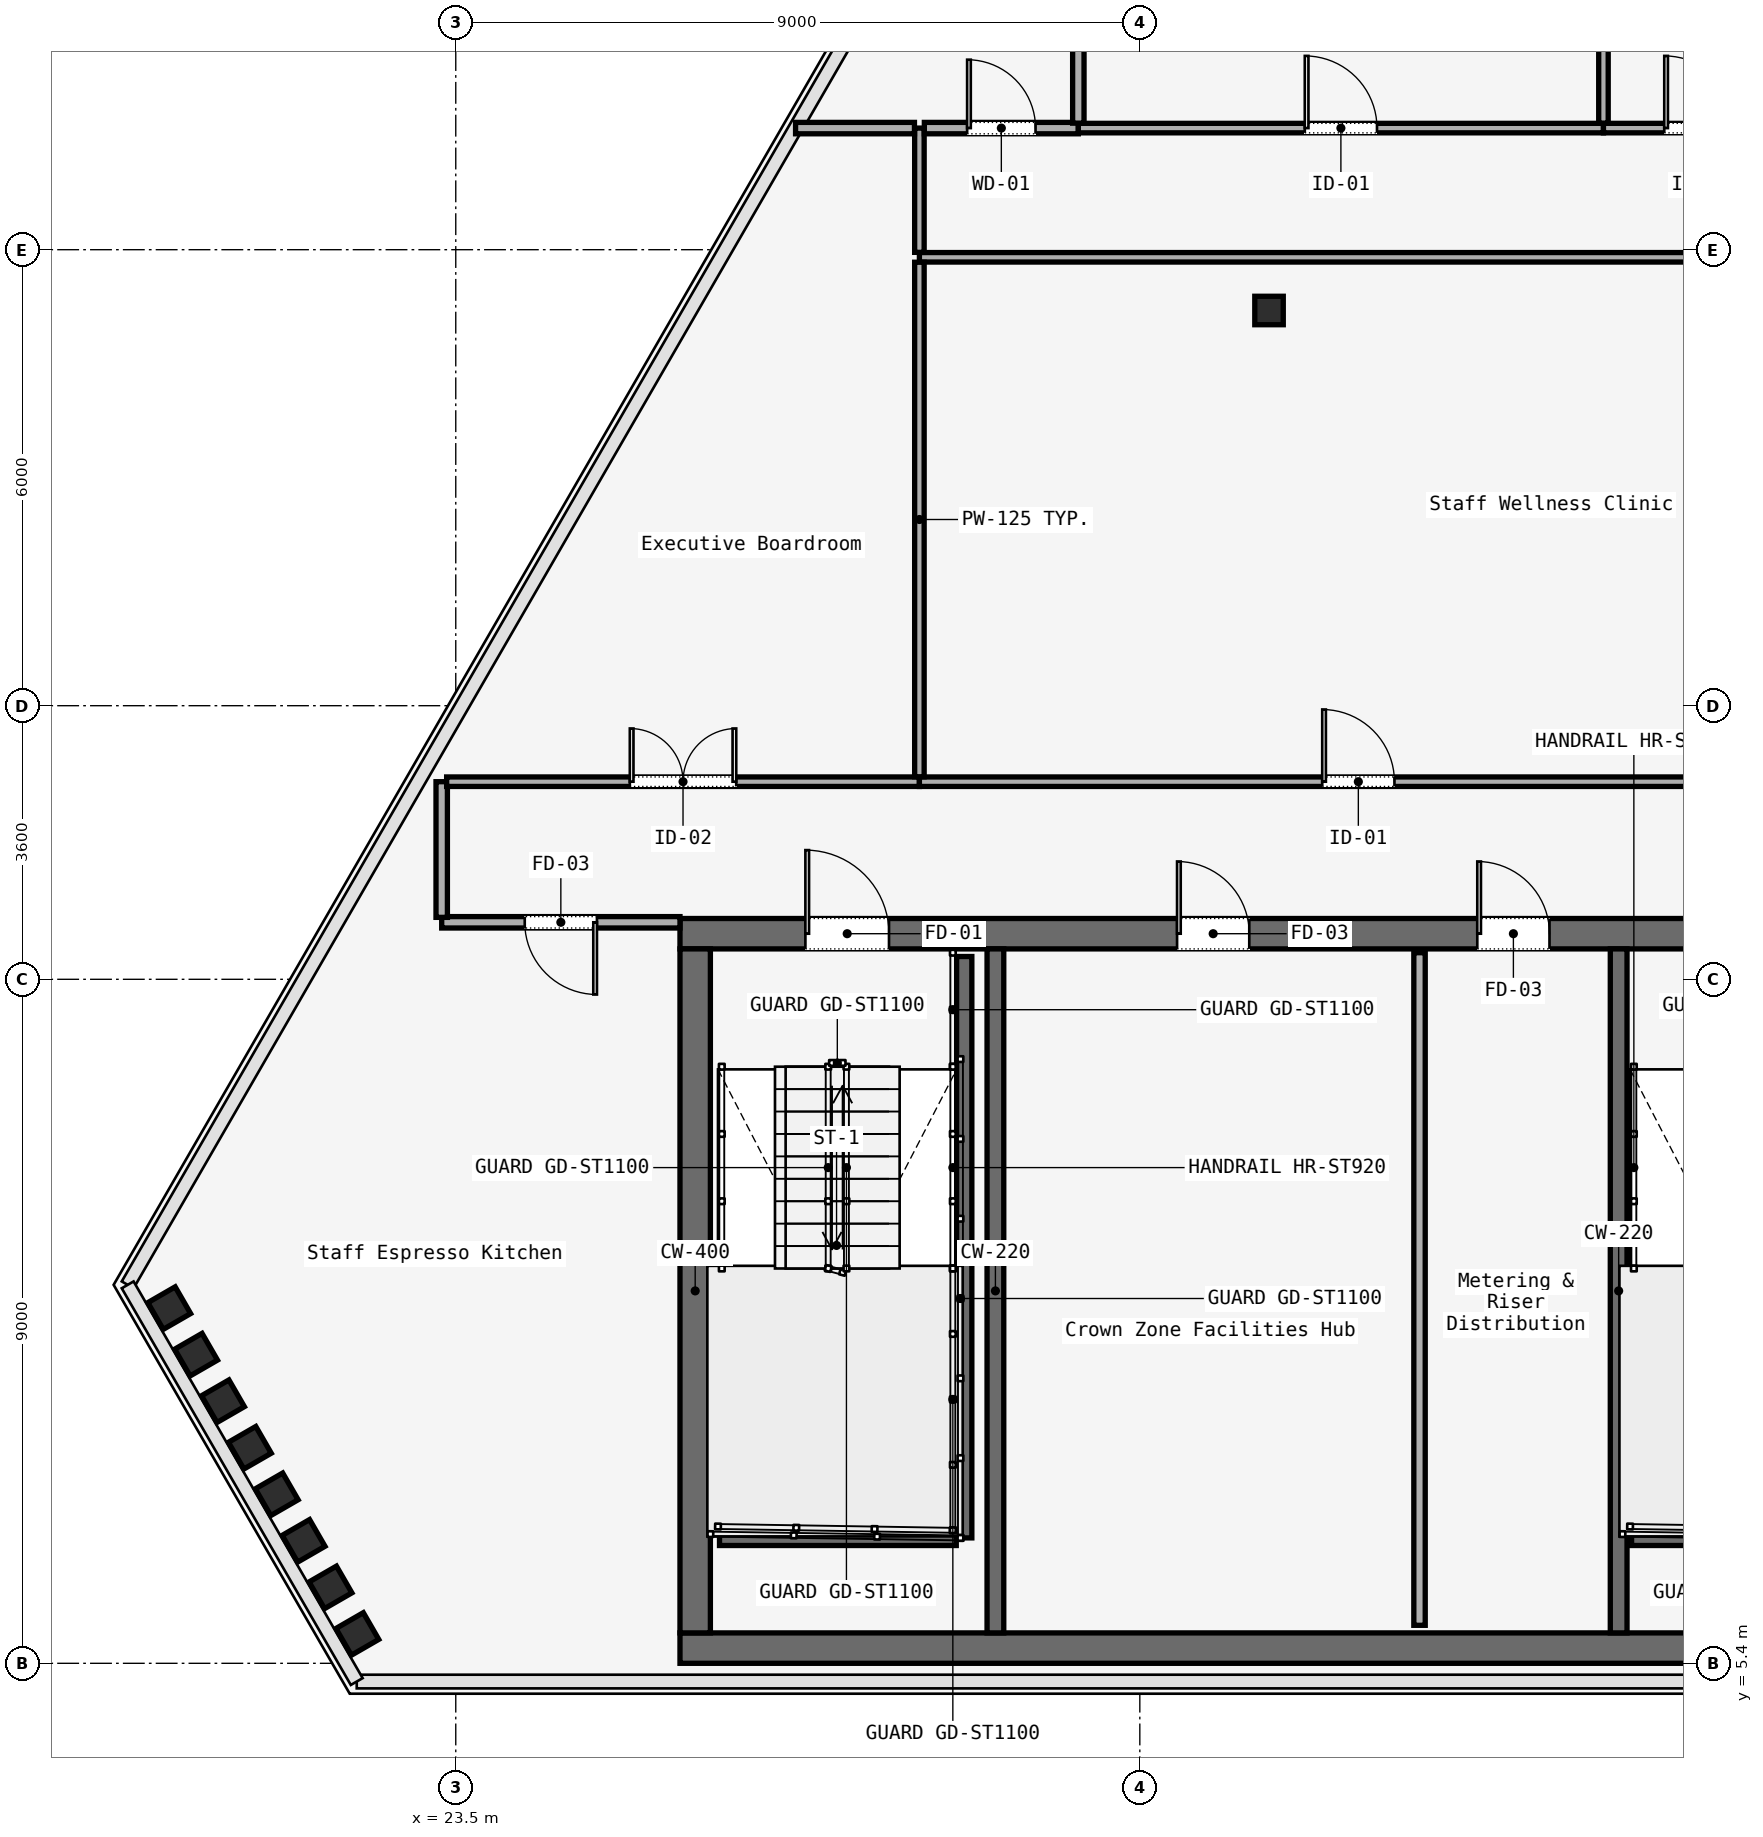
"""IFC4 building model, lengths in metres.
Left out: names, types, materials, properties, quantities, classifications, styles, units other than length and angle.
Written with IfcOpenShell. Run it as: python <this file> out.ifc"""

import sys

from ifc_helpers import new_model, si_unit, direction, frame, frame_2d, origin, origin_2d, place, context, subcontext, project, spatial, rectangle, i_section, extrude, element, fill, save


model = new_model("IFC4")
c1 = context("Model", 3, precision=1e-05, world=origin(), true_north=direction((0.0, 1.0)))
c2 = subcontext(c1, "Body", "Model", "MODEL_VIEW")
j1 = project(units=[si_unit("LENGTHUNIT", "METRE"), si_unit("PLANEANGLEUNIT", "RADIAN")], contexts=[c1])
p1 = place(None, origin())
s1 = spatial("IfcSite", under=j1, at=p1, CompositionType="ELEMENT")
p2 = place(p1, origin())
s2 = spatial("IfcBuilding", under=s1, at=p2, CompositionType="ELEMENT")
p3 = place(p2, frame((0.0, 0.0, 252.2)))
s3 = spatial("IfcBuildingStorey", under=s2, at=p3, CompositionType="ELEMENT", Elevation=252.2)
p4 = place(p3, frame((26.45, 15.0, 0.0), z_axis=(0.0, 0.0, 1.0), x_axis=(1.0, 0.0, 0.0)))
e1 = element("IfcWall", 1, at=p4, inside=s3, PredefinedType="SOLIDWALL", context=c2, shape_type="SweptSolid", body=[
    extrude(rectangle(XDim=31.1, YDim=0.4, at=frame_2d((15.55, 0.0))), origin(), (0.0, 0.0, 1.0), 3.58),
])
p5 = place(p4, frame((1.65, 0.0, 0.0)))
e2 = element("IfcOpeningElement", 2, at=p5, cuts=e1, PredefinedType="OPENING", context=c2, shape_type="SweptSolid", body=[
    extrude(rectangle(XDim=1.1, YDim=2.2, at=frame_2d((0.55, 1.1))), frame((0.0, 0.2, 0.0), z_axis=(0.0, -1.0, 0.0), x_axis=(1.0, 0.0, 0.0)), (0.0, 0.0, 1.0), 0.4),
])
p6 = place(p4, frame((13.65, 0.0, 0.0)))
e3 = element("IfcOpeningElement", 3, at=p6, cuts=e1, PredefinedType="OPENING", context=c2, shape_type="SweptSolid", body=[
    extrude(rectangle(XDim=1.1, YDim=2.2, at=frame_2d((0.55, 1.1))), frame((0.0, 0.2, 0.0), z_axis=(0.0, -1.0, 0.0), x_axis=(1.0, 0.0, 0.0)), (0.0, 0.0, 1.0), 0.4),
])
p7 = place(p4, frame((25.55, 0.0, 0.0)))
e4 = element("IfcOpeningElement", 4, at=p7, cuts=e1, PredefinedType="OPENING", context=c2, shape_type="SweptSolid", body=[
    extrude(rectangle(XDim=1.1, YDim=2.2, at=frame_2d((0.55, 1.1))), frame((0.0, 0.2, 0.0), z_axis=(0.0, -1.0, 0.0), x_axis=(1.0, 0.0, 0.0)), (0.0, 0.0, 1.0), 0.4),
])
p8 = place(p4, frame((19.35, 0.0, 0.0)))
e5 = element("IfcOpeningElement", 5, at=p8, cuts=e1, PredefinedType="OPENING", context=c2, shape_type="SweptSolid", body=[
    extrude(rectangle(XDim=1.1, YDim=2.2, at=frame_2d((0.55, 1.1))), frame((0.0, 0.2, 0.0), z_axis=(0.0, -1.0, 0.0), x_axis=(1.0, 0.0, 0.0)), (0.0, 0.0, 1.0), 0.4),
])
p9 = place(p4, frame((21.4, 0.0, 0.0)))
e6 = element("IfcOpeningElement", 6, at=p9, cuts=e1, PredefinedType="OPENING", context=c2, shape_type="SweptSolid", body=[
    extrude(rectangle(XDim=0.9, YDim=2.1, at=frame_2d((0.45, 1.05))), frame((0.0, 0.2, 0.0), z_axis=(0.0, -1.0, 0.0), x_axis=(1.0, 0.0, 0.0)), (0.0, 0.0, 1.0), 0.4),
])
p10 = place(p4, frame((6.54, 0.0, 0.0)))
e7 = element("IfcOpeningElement", 7, at=p10, cuts=e1, PredefinedType="OPENING", context=c2, shape_type="SweptSolid", body=[
    extrude(rectangle(XDim=0.95, YDim=2.2, at=frame_2d((0.475, 1.1))), frame((0.0, 0.2, 0.0), z_axis=(0.0, -1.0, 0.0), x_axis=(1.0, 0.0, 0.0)), (0.0, 0.0, 1.0), 0.4),
])
p11 = place(p4, frame((10.49, 0.0, 0.0)))
e8 = element("IfcOpeningElement", 8, at=p11, cuts=e1, PredefinedType="OPENING", context=c2, shape_type="SweptSolid", body=[
    extrude(rectangle(XDim=0.95, YDim=2.2, at=frame_2d((0.475, 1.1))), frame((0.0, 0.2, 0.0), z_axis=(0.0, -1.0, 0.0), x_axis=(1.0, 0.0, 0.0)), (0.0, 0.0, 1.0), 0.4),
])
p12 = place(p4, frame((23.35, 0.0, 0.0)))
e9 = element("IfcOpeningElement", 9, at=p12, cuts=e1, PredefinedType="OPENING", context=c2, shape_type="SweptSolid", body=[
    extrude(rectangle(XDim=1.3, YDim=2.3, at=frame_2d((0.65, 1.15))), frame((0.0, 0.2, 0.0), z_axis=(0.0, -1.0, 0.0), x_axis=(1.0, 0.0, 0.0)), (0.0, 0.0, 1.0), 0.4),
])
p13 = place(p3, frame((26.45, 5.6, 0.0), z_axis=(0.0, 0.0, 1.0), x_axis=(1.0, 0.0, 0.0)))
e10 = element("IfcWall", 10, at=p13, inside=s3, PredefinedType="SOLIDWALL", context=c2, shape_type="SweptSolid", body=[
    extrude(rectangle(XDim=31.1, YDim=0.4, at=frame_2d((15.55, 0.0))), origin(), (0.0, 0.0, 1.0), 3.58),
])
p14 = place(p3, frame((26.65, 5.8, 0.0), z_axis=(0.0, 0.0, 1.0), x_axis=(0.0, 1.0, 0.0)))
e11 = element("IfcWall", 11, at=p14, inside=s3, PredefinedType="SOLIDWALL", context=c2, shape_type="SweptSolid", body=[
    extrude(rectangle(XDim=9.0, YDim=0.4, at=frame_2d((4.5, 0.0))), origin(), (0.0, 0.0, 1.0), 3.58),
])
for number, where, z_axis, x_axis in (
    (12, (30.6, 5.8, 0.0), (0.0, 0.0, 1.0), (0.0, 1.0, 0.0)),
    (13, (38.8, 5.8, 0.0), (0.0, 0.0, 1.0), (0.0, 1.0, 0.0)),
):
    element("IfcWall", number, at=place(p3, frame(where, z_axis=z_axis, x_axis=x_axis)), inside=s3, PredefinedType="SOLIDWALL", context=c2, shape_type="SweptSolid", body=[
        extrude(rectangle(XDim=9.0, YDim=0.22, at=frame_2d((4.5, 0.0))), origin(), (0.0, 0.0, 1.0), 3.58),
    ])
p15 = place(p3, frame((34.2, 23.2, 0.0), z_axis=(0.0, 0.0, 1.0), x_axis=(1.0, 0.0, 0.0)))
e14 = element("IfcColumn", 14, at=p15, inside=s3, PredefinedType="COLUMN", context=c2, shape_type="SweptSolid", body=[
    extrude(i_section(OverallWidth=0.375, OverallDepth=0.375, WebThickness=0.017, FlangeThickness=0.027, FilletRadius=0.015, at=origin_2d()), origin(), (0.0, 0.0, 1.0), 3.58),
])
for number, where, z_axis, x_axis in (
    (15, (19.73, 10.073, 0.0), (0.0, 0.0, 1.0), (-0.5, 0.866, 0.0)),
    (16, (20.083, 9.461, 0.0), (0.0, 0.0, 1.0), (-0.5, 0.866, 0.0)),
    (17, (20.437, 8.849, 0.0), (0.0, 0.0, 1.0), (-0.5, 0.866, 0.0)),
    (18, (20.791, 8.236, 0.0), (0.0, 0.0, 1.0), (-0.5, 0.866, 0.0)),
    (19, (21.144, 7.624, 0.0), (0.0, 0.0, 1.0), (-0.5, 0.866, 0.0)),
    (20, (21.498, 7.011, 0.0), (0.0, 0.0, 1.0), (-0.5, 0.866, 0.0)),
    (21, (21.851, 6.399, 0.0), (0.0, 0.0, 1.0), (-0.5, 0.866, 0.0)),
    (22, (22.205, 5.786, 0.0), (0.0, 0.0, 1.0), (-0.5, 0.866, 0.0)),
):
    element("IfcColumn", number, at=place(p3, frame(where, z_axis=z_axis, x_axis=x_axis)), inside=s3, PredefinedType="COLUMN", context=c2, shape_type="SweptSolid", body=[
        extrude(i_section(OverallWidth=0.406, OverallDepth=0.416, WebThickness=0.03, FlangeThickness=0.037, FilletRadius=0.015, at=origin_2d()), origin(), (0.0, 0.0, 1.0), 3.58),
    ])
p16 = place(p3, frame((30.19, 14.7, 0.0), z_axis=(0.0, 0.0, 1.0), x_axis=(0.0, -1.0, 0.0)))
e23 = element("IfcWall", 23, at=p16, inside=s3, PredefinedType="SOLIDWALL", context=c2, shape_type="SweptSolid", body=[
    extrude(rectangle(XDim=7.65, YDim=0.2, at=frame_2d((3.825, 0.0))), origin(), (0.0, 0.0, 1.0), 3.8),
])
for number, where, z_axis, x_axis in (
    (24, (26.97, 7.05, 0.0), (0.0, 0.0, 1.0), (1.0, 0.0, 0.0)),
    (25, (38.97, 7.05, 0.0), (0.0, 0.0, 1.0), (1.0, 0.0, 0.0)),
):
    element("IfcWall", number, at=place(p3, frame(where, z_axis=z_axis, x_axis=x_axis)), inside=s3, PredefinedType="SOLIDWALL", context=c2, shape_type="SweptSolid", body=[
        extrude(rectangle(XDim=3.115, YDim=0.2, at=frame_2d((1.558, 0.0))), origin(), (0.0, 0.0, 1.0), 3.8),
    ])
p17 = place(p3, frame((36.18, 5.9, 0.0), z_axis=(0.0, 0.0, 1.0), x_axis=(0.0, 1.0, 0.0)))
e26 = element("IfcWall", 26, at=p17, inside=s3, PredefinedType="PARTITIONING", context=c2, shape_type="SweptSolid", body=[
    extrude(rectangle(XDim=8.85, YDim=0.15, at=frame_2d((4.425, 0.0))), origin(), (0.0, 0.0, 1.0), 3.01),
])
p18 = place(p3, frame((26.45, 15.15, 0.0), z_axis=(0.0, 0.0, 1.0), x_axis=(-1.0, 0.0, 0.0)))
e27 = element("IfcWall", 27, at=p18, inside=s3, PredefinedType="PARTITIONING", context=c2, shape_type="SweptSolid", body=[
    extrude(rectangle(XDim=3.135, YDim=0.15, at=frame_2d((1.567, 0.0))), origin(), (0.0, 0.0, 1.0), 3.01),
])
p19 = place(p18, frame((1.093, 0.0, 0.0)))
e28 = element("IfcOpeningElement", 28, at=p19, cuts=e27, PredefinedType="OPENING", context=c2, shape_type="SweptSolid", body=[
    extrude(rectangle(XDim=0.95, YDim=2.2, at=frame_2d((0.475, 1.1))), frame((0.0, 0.075, 0.0), z_axis=(0.0, -1.0, 0.0), x_axis=(1.0, 0.0, 0.0)), (0.0, 0.0, 1.0), 0.15),
])
p20 = place(p3, frame((23.315, 15.215, 0.0), z_axis=(0.0, 0.0, 1.0), x_axis=(0.0, 1.0, 0.0)))
e29 = element("IfcWall", 29, at=p20, inside=s3, PredefinedType="PARTITIONING", context=c2, shape_type="SweptSolid", body=[
    extrude(rectangle(XDim=1.785, YDim=0.15, at=frame_2d((0.893, 0.0))), origin(), (0.0, 0.0, 1.0), 3.01),
])
p21 = place(p3, frame((23.38, 17.0, 0.0), z_axis=(0.0, 0.0, 1.0), x_axis=(1.0, 0.0, 0.0)))
e30 = element("IfcWall", 30, at=p21, inside=s3, PredefinedType="PARTITIONING", context=c2, shape_type="SweptSolid", body=[
    extrude(rectangle(XDim=6.22, YDim=0.125, at=frame_2d((3.11, 0.0))), origin(), (0.0, 0.0, 1.0), 3.01),
])
p22 = place(p21, frame((2.41, 0.0, 0.0)))
e31 = element("IfcOpeningElement", 31, at=p22, cuts=e30, PredefinedType="OPENING", context=c2, shape_type="SweptSolid", body=[
    extrude(rectangle(XDim=1.4, YDim=2.2, at=frame_2d((0.7, 1.1))), frame((0.0, 0.062, 0.0), z_axis=(0.0, -1.0, 0.0), x_axis=(1.0, 0.0, 0.0)), (0.0, 0.0, 1.0), 0.125),
])
p23 = place(p3, frame((29.6, 17.0, 0.0), z_axis=(0.0, 0.0, 1.0), x_axis=(1.0, 0.0, 0.0)))
e32 = element("IfcWall", 32, at=p23, inside=s3, PredefinedType="PARTITIONING", context=c2, shape_type="SweptSolid", body=[
    extrude(rectangle(XDim=11.55, YDim=0.125, at=frame_2d((5.775, 0.0))), origin(), (0.0, 0.0, 1.0), 3.01),
])
p24 = place(p23, frame((5.3, 0.0, 0.0)))
e33 = element("IfcOpeningElement", 33, at=p24, cuts=e32, PredefinedType="OPENING", context=c2, shape_type="SweptSolid", body=[
    extrude(rectangle(XDim=0.95, YDim=2.2, at=frame_2d((0.475, 1.1))), frame((0.0, 0.062, 0.0), z_axis=(0.0, -1.0, 0.0), x_axis=(1.0, 0.0, 0.0)), (0.0, 0.0, 1.0), 0.125),
])
p25 = place(p3, frame((41.085, 23.9, 0.0), z_axis=(0.0, 0.0, 1.0), x_axis=(-1.0, 0.0, 0.0)))
e34 = element("IfcWall", 34, at=p25, inside=s3, PredefinedType="PARTITIONING", context=c2, shape_type="SweptSolid", body=[
    extrude(rectangle(XDim=11.485, YDim=0.125, at=frame_2d((5.742, 0.0))), origin(), (0.0, 0.0, 1.0), 3.01),
])
p26 = place(p3, frame((29.6, 23.965, 0.0), z_axis=(0.0, 0.0, 1.0), x_axis=(0.0, 1.0, 0.0)))
e35 = element("IfcWall", 35, at=p26, inside=s3, PredefinedType="PARTITIONING", context=c2, shape_type="SweptSolid", body=[
    extrude(rectangle(XDim=1.635, YDim=0.125, at=frame_2d((0.817, 0.0))), origin(), (0.0, 0.0, 1.0), 3.01),
])
p27 = place(p3, frame((29.665, 25.6, 0.0), z_axis=(0.0, 0.0, 1.0), x_axis=(1.0, 0.0, 0.0)))
e36 = element("IfcWall", 36, at=p27, inside=s3, PredefinedType="PARTITIONING", context=c2, shape_type="SweptSolid", body=[
    extrude(rectangle(XDim=2.026, YDim=0.15, at=frame_2d((1.013, 0.0))), origin(), (0.0, 0.0, 1.0), 3.01),
])
p28 = place(p27, frame((0.563, 0.0, 0.0)))
e37 = element("IfcOpeningElement", 37, at=p28, cuts=e36, PredefinedType="OPENING", context=c2, shape_type="SweptSolid", body=[
    extrude(rectangle(XDim=0.9, YDim=2.15, at=frame_2d((0.45, 1.075))), frame((0.0, 0.075, 0.0), z_axis=(0.0, -1.0, 0.0), x_axis=(1.0, 0.0, 0.0)), (0.0, 0.0, 1.0), 0.15),
])
p29 = place(p3, frame((31.691, 25.6, 0.0), z_axis=(0.0, 0.0, 1.0), x_axis=(1.0, 0.0, 0.0)))
e38 = element("IfcWall", 38, at=p29, inside=s3, PredefinedType="PARTITIONING", context=c2, shape_type="SweptSolid", body=[
    extrude(rectangle(XDim=6.909, YDim=0.125, at=frame_2d((3.455, 0.0))), origin(), (0.0, 0.0, 1.0), 3.01),
])
p30 = place(p29, frame((2.979, 0.0, 0.0)))
e39 = element("IfcOpeningElement", 39, at=p30, cuts=e38, PredefinedType="OPENING", context=c2, shape_type="SweptSolid", body=[
    extrude(rectangle(XDim=0.95, YDim=2.2, at=frame_2d((0.475, 1.1))), frame((0.0, 0.062, 0.0), z_axis=(0.0, -1.0, 0.0), x_axis=(1.0, 0.0, 0.0)), (0.0, 0.0, 1.0), 0.125),
])
p31 = place(p3, frame((38.6, 25.6, 0.0), z_axis=(0.0, 0.0, 1.0), x_axis=(1.0, 0.0, 0.0)))
e40 = element("IfcWall", 40, at=p31, inside=s3, PredefinedType="PARTITIONING", context=c2, shape_type="SweptSolid", body=[
    extrude(rectangle(XDim=2.55, YDim=0.125, at=frame_2d((1.275, 0.0))), origin(), (0.0, 0.0, 1.0), 3.01),
])
p32 = place(p31, frame((0.8, 0.0, 0.0)))
e41 = element("IfcOpeningElement", 41, at=p32, cuts=e40, PredefinedType="OPENING", context=c2, shape_type="SweptSolid", body=[
    extrude(rectangle(XDim=0.95, YDim=2.2, at=frame_2d((0.475, 1.1))), frame((0.0, 0.062, 0.0), z_axis=(0.0, -1.0, 0.0), x_axis=(1.0, 0.0, 0.0)), (0.0, 0.0, 1.0), 0.125),
])
p33 = place(p3, frame((29.6, 23.835, 0.0), z_axis=(0.0, 0.0, 1.0), x_axis=(0.0, -1.0, 0.0)))
e42 = element("IfcWall", 42, at=p33, inside=s3, PredefinedType="PARTITIONING", context=c2, shape_type="SweptSolid", body=[
    extrude(rectangle(XDim=6.77, YDim=0.125, at=frame_2d((3.385, 0.0))), origin(), (0.0, 0.0, 1.0), 3.01),
])
p34 = place(p3, frame((27.971, 25.6, 0.0), z_axis=(0.0, 0.0, 1.0), x_axis=(1.0, 0.0, 0.0)))
e43 = element("IfcWall", 43, at=p34, inside=s3, PredefinedType="PARTITIONING", context=c2, shape_type="SweptSolid", body=[
    extrude(rectangle(XDim=1.564, YDim=0.15, at=frame_2d((0.782, 0.0))), origin(), (0.0, 0.0, 1.0), 3.01),
])
p35 = place(p3, frame((31.691, 32.044, 0.0), z_axis=(0.0, 0.0, 1.0), x_axis=(0.0, -1.0, 0.0)))
e44 = element("IfcWall", 44, at=p35, inside=s3, PredefinedType="PARTITIONING", context=c2, shape_type="SweptSolid", body=[
    extrude(rectangle(XDim=6.379, YDim=0.15, at=frame_2d((3.189, 0.0))), origin(), (0.0, 0.0, 1.0), 3.01),
])
p36 = place(p3, frame((38.6, 44.01, 0.0), z_axis=(0.0, 0.0, 1.0), x_axis=(0.0, -1.0, 0.0)))
e45 = element("IfcWall", 45, at=p36, inside=s3, PredefinedType="PARTITIONING", context=c2, shape_type="SweptSolid", body=[
    extrude(rectangle(XDim=18.345, YDim=0.125, at=frame_2d((9.173, 0.0))), origin(), (0.0, 0.0, 1.0), 3.01),
])
p37 = place(p5, origin())
e46 = element("IfcDoor", 46, at=p37, inside=s3, OperationType="SINGLE_SWING_RIGHT", PredefinedType="DOOR", context=c2, shape_type="SweptSolid", body=[
    extrude(rectangle(XDim=1.1, YDim=2.2, at=frame_2d((0.55, 1.1))), frame((0.0, 0.025, 0.0), z_axis=(0.0, -1.0, 0.0), x_axis=(1.0, 0.0, 0.0)), (0.0, 0.0, 1.0), 0.05),
])
fill(e2, e46)
p38 = place(p10, origin())
e47 = element("IfcDoor", 47, at=p38, inside=s3, OperationType="SINGLE_SWING_LEFT", PredefinedType="DOOR", context=c2, shape_type="SweptSolid", body=[
    extrude(rectangle(XDim=0.95, YDim=2.2, at=frame_2d((0.475, 1.1))), frame((0.0, 0.025, 0.0), z_axis=(0.0, -1.0, 0.0), x_axis=(1.0, 0.0, 0.0)), (0.0, 0.0, 1.0), 0.05),
])
fill(e7, e47)
p39 = place(p11, origin())
e48 = element("IfcDoor", 48, at=p39, inside=s3, OperationType="SINGLE_SWING_RIGHT", PredefinedType="DOOR", context=c2, shape_type="SweptSolid", body=[
    extrude(rectangle(XDim=0.95, YDim=2.2, at=frame_2d((0.475, 1.1))), frame((0.0, 0.025, 0.0), z_axis=(0.0, -1.0, 0.0), x_axis=(1.0, 0.0, 0.0)), (0.0, 0.0, 1.0), 0.05),
])
fill(e8, e48)
p40 = place(p19, origin())
e49 = element("IfcDoor", 49, at=p40, inside=s3, OperationType="SINGLE_SWING_RIGHT", PredefinedType="DOOR", context=c2, shape_type="SweptSolid", body=[
    extrude(rectangle(XDim=0.95, YDim=2.2, at=frame_2d((0.475, 1.1))), frame((0.0, 0.025, 0.0), z_axis=(0.0, -1.0, 0.0), x_axis=(1.0, 0.0, 0.0)), (0.0, 0.0, 1.0), 0.05),
])
fill(e28, e49)
p41 = place(p22, origin())
e50 = element("IfcDoor", 50, at=p41, inside=s3, OperationType="SINGLE_SWING_RIGHT", PredefinedType="DOOR", context=c2, shape_type="SweptSolid", body=[
    extrude(rectangle(XDim=1.4, YDim=2.2, at=frame_2d((0.7, 1.1))), frame((0.0, 0.025, 0.0), z_axis=(0.0, -1.0, 0.0), x_axis=(1.0, 0.0, 0.0)), (0.0, 0.0, 1.0), 0.05),
])
fill(e31, e50)
p42 = place(p24, origin())
e51 = element("IfcDoor", 51, at=p42, inside=s3, OperationType="SINGLE_SWING_LEFT", PredefinedType="DOOR", context=c2, shape_type="SweptSolid", body=[
    extrude(rectangle(XDim=0.95, YDim=2.2, at=frame_2d((0.475, 1.1))), frame((0.0, 0.025, 0.0), z_axis=(0.0, -1.0, 0.0), x_axis=(1.0, 0.0, 0.0)), (0.0, 0.0, 1.0), 0.05),
])
fill(e33, e51)
p43 = place(p28, origin())
e52 = element("IfcDoor", 52, at=p43, inside=s3, OperationType="SINGLE_SWING_RIGHT", PredefinedType="DOOR", context=c2, shape_type="SweptSolid", body=[
    extrude(rectangle(XDim=0.9, YDim=2.15, at=frame_2d((0.45, 1.075))), frame((0.0, 0.025, 0.0), z_axis=(0.0, -1.0, 0.0), x_axis=(1.0, 0.0, 0.0)), (0.0, 0.0, 1.0), 0.05),
])
fill(e37, e52)
p44 = place(p30, origin())
e53 = element("IfcDoor", 53, at=p44, inside=s3, OperationType="SINGLE_SWING_RIGHT", PredefinedType="DOOR", context=c2, shape_type="SweptSolid", body=[
    extrude(rectangle(XDim=0.95, YDim=2.2, at=frame_2d((0.475, 1.1))), frame((0.0, 0.025, 0.0), z_axis=(0.0, -1.0, 0.0), x_axis=(1.0, 0.0, 0.0)), (0.0, 0.0, 1.0), 0.05),
])
fill(e39, e53)
p45 = place(p32, origin())
e54 = element("IfcDoor", 54, at=p45, inside=s3, OperationType="SINGLE_SWING_LEFT", PredefinedType="DOOR", context=c2, shape_type="SweptSolid", body=[
    extrude(rectangle(XDim=0.95, YDim=2.2, at=frame_2d((0.475, 1.1))), frame((0.0, 0.025, 0.0), z_axis=(0.0, -1.0, 0.0), x_axis=(1.0, 0.0, 0.0)), (0.0, 0.0, 1.0), 0.05),
])
fill(e41, e54)
save(model, sys.argv[1])
